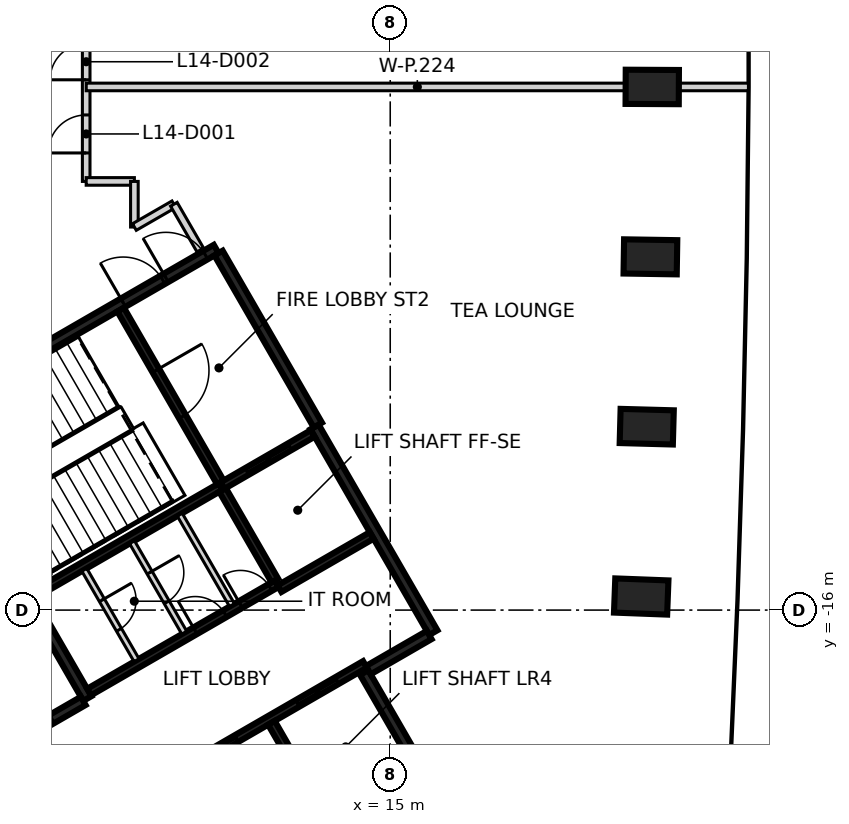
"""IFC4 building model, lengths in metres.
Left out: names, types, materials, properties, quantities, classifications, styles, units other than length and angle.
Written with IfcOpenShell. Run it as: python <this file> out.ifc"""

import sys

from ifc_helpers import new_model, si_unit, direction, frame, frame_2d, origin, origin_2d, place, context, subcontext, project, spatial, rectangle, extrude, element, fill, save


model = new_model("IFC4")
c1 = context("Model", 3, precision=1e-05, world=origin(), true_north=direction((0.0, 1.0)))
c2 = subcontext(c1, "Body", "Model", "MODEL_VIEW")
j1 = project(units=[si_unit("LENGTHUNIT", "METRE"), si_unit("PLANEANGLEUNIT", "RADIAN")], contexts=[c1])
p1 = place(None, origin())
s1 = spatial("IfcSite", under=j1, at=p1, CompositionType="ELEMENT")
p2 = place(p1, origin())
s2 = spatial("IfcBuilding", under=s1, at=p2, CompositionType="ELEMENT")
p3 = place(p2, frame((0.0, 0.0, 63.8)))
s3 = spatial("IfcBuildingStorey", under=s2, at=p3, CompositionType="ELEMENT", Elevation=63.8)
for number, where, z_axis, x_axis in (
    (1, (21.604, -15.643, -0.475), (0.0, 0.0, 1.0), (-0.999, 0.038, 0.0)),
    (2, (21.749, -11.174, -0.475), (0.0, 0.0, 1.0), (-1.0, 0.027, 0.0)),
    (3, (21.846, -6.706, -0.475), (0.0, 0.0, 1.0), (-1.0, 0.016, 0.0)),
    (4, (21.894, -2.235, -0.475), (0.0, 0.0, 1.0), (-1.0, 0.005, 0.0)),
):
    element("IfcColumn", number, at=place(p3, frame(where, z_axis=z_axis, x_axis=x_axis)), inside=s3, PredefinedType="COLUMN", context=c2, shape_type="SweptSolid", body=[
        extrude(rectangle(XDim=1.4, YDim=0.9, at=origin_2d()), origin(), (0.0, 0.0, 1.0), 3.6),
    ])
p4 = place(p3, frame((0.417, -12.273, 0.0), z_axis=(0.0, 0.0, 1.0), x_axis=(0.866021906294, 0.500006057782, 0.0)))
e5 = element("IfcWall", 5, at=p4, inside=s3, PredefinedType="SHEAR", context=c2, shape_type="SweptSolid", body=[
    extrude(rectangle(XDim=11.55, YDim=0.25, at=frame_2d((5.775, 0.0))), origin(), (0.0, 0.0, 1.0), 3.125),
])
p5 = place(p4, frame((10.025, 0.0, 0.0)))
e6 = element("IfcOpeningElement", 6, at=p5, cuts=e5, PredefinedType="OPENING", context=c2, shape_type="SweptSolid", body=[
    extrude(rectangle(XDim=1.2, YDim=2.1, at=frame_2d((0.6, 1.05))), frame((0.0, 0.135, 0.0), z_axis=(0.0, -1.0, 0.0), x_axis=(1.0, 0.0, 0.0)), (0.0, 0.0, 1.0), 0.27),
])
p6 = place(p4, frame((8.725, 0.0, 0.0)))
e7 = element("IfcOpeningElement", 7, at=p6, cuts=e5, PredefinedType="OPENING", context=c2, shape_type="SweptSolid", body=[
    extrude(rectangle(XDim=1.2, YDim=2.1, at=frame_2d((0.6, 1.05))), frame((0.0, 0.135, 0.0), z_axis=(0.0, -1.0, 0.0), x_axis=(1.0, 0.0, 0.0)), (0.0, 0.0, 1.0), 0.27),
])
p7 = place(p3, frame((13.008, -11.181, 0.0), z_axis=(0.0, 0.0, 1.0), x_axis=(0.500004234368, -0.866022959057, 0.0)))
e8 = element("IfcWall", 8, at=p7, inside=s3, PredefinedType="SHEAR", context=c2, shape_type="SweptSolid", body=[
    extrude(rectangle(XDim=6.25, YDim=0.25, at=frame_2d((3.125, 0.0))), origin(), (0.0, 0.0, 1.0), 3.125),
])
p8 = place(p3, frame((10.483, -6.606, 0.0), z_axis=(0.0, 0.0, 1.0), x_axis=(0.49999885962, -0.866026062182, 0.0)))
e9 = element("IfcWall", 9, at=p8, inside=s3, PredefinedType="SHEAR", context=c2, shape_type="SweptSolid", body=[
    extrude(rectangle(XDim=5.225, YDim=0.25, at=frame_2d((2.612, 0.0))), origin(), (0.0, 0.0, 1.0), 3.125),
])
p9 = place(p3, frame((7.031, -18.327, 0.0), z_axis=(0.0, 0.0, 1.0), x_axis=(-0.499971222258, 0.866042017984, 0.0)))
e10 = element("IfcWall", 10, at=p9, inside=s3, PredefinedType="SHEAR", context=c2, shape_type="SweptSolid", body=[
    extrude(rectangle(XDim=3.2, YDim=0.25, at=frame_2d((1.6, 0.0))), origin(), (0.0, 0.0, 1.0), 3.125),
])
p10 = place(p3, frame((14.315, -17.644, 0.0), z_axis=(0.0, 0.0, 1.0), x_axis=(0.500023226632, -0.866011993467, 0.0)))
e11 = element("IfcWall", 11, at=p10, inside=s3, PredefinedType="SHEAR", context=c2, shape_type="SweptSolid", body=[
    extrude(rectangle(XDim=2.974, YDim=0.25, at=frame_2d((1.487, 0.0))), origin(), (0.0, 0.0, 1.0), 3.125),
])
p11 = place(p3, frame((16.025, -16.656, 0.0), z_axis=(0.0, 0.0, 1.0), x_axis=(-0.866016279763, -0.500015802937, 0.0)))
e12 = element("IfcWall", 12, at=p11, inside=s3, PredefinedType="SHEAR", context=c2, shape_type="SweptSolid", body=[
    extrude(rectangle(XDim=1.849, YDim=0.25, at=frame_2d((0.925, 0.0))), origin(), (0.0, 0.0, 1.0), 3.125),
])
p12 = place(p3, frame((6.065, -18.885, 0.0), z_axis=(0.0, 0.0, 1.0), x_axis=(0.866017078145, 0.500014420154, 0.0)))
e13 = element("IfcWall", 13, at=p12, inside=s3, PredefinedType="SHEAR", context=c2, shape_type="SweptSolid", body=[
    extrude(rectangle(XDim=0.989, YDim=0.25, at=frame_2d((0.495, 0.0))), origin(), (0.0, 0.0, 1.0), 3.125),
])
p13 = place(p3, frame((6.08, -20.1, 0.0), z_axis=(0.0, 0.0, 1.0), x_axis=(-0.500051773299, 0.865995510393, 0.0)))
e14 = element("IfcWall", 14, at=p13, inside=s3, PredefinedType="SHEAR", context=c2, shape_type="SweptSolid", body=[
    extrude(rectangle(XDim=0.685, YDim=0.25, at=frame_2d((0.342, 0.0))), origin(), (0.0, 0.0, 1.0), 3.125),
])
p14 = place(p3, frame((9.052, -20.48, 0.0), z_axis=(0.0, 0.0, 1.0), x_axis=(0.866030299012, 0.499991521122, 0.0)))
e15 = element("IfcWall", 15, at=p14, inside=s3, PredefinedType="SHEAR", context=c2, shape_type="SweptSolid", body=[
    extrude(rectangle(XDim=6.1, YDim=0.2, at=frame_2d((3.05, 0.0))), origin(), (0.0, 0.0, 1.0), 3.125),
])
p15 = place(p14, frame((1.0, 0.0, 0.0)))
e16 = element("IfcOpeningElement", 16, at=p15, cuts=e15, PredefinedType="OPENING", context=c2, shape_type="SweptSolid", body=[
    extrude(rectangle(XDim=1.2, YDim=2.1, at=frame_2d((0.6, 1.05))), frame((0.0, 0.11, 0.0), z_axis=(0.0, -1.0, 0.0), x_axis=(1.0, 0.0, 0.0)), (0.0, 0.0, 1.0), 0.22),
])
p16 = place(p14, frame((4.05, 0.0, 0.0)))
e17 = element("IfcOpeningElement", 17, at=p16, cuts=e15, PredefinedType="OPENING", context=c2, shape_type="SweptSolid", body=[
    extrude(rectangle(XDim=1.2, YDim=2.1, at=frame_2d((0.6, 1.05))), frame((0.0, 0.11, 0.0), z_axis=(0.0, -1.0, 0.0), x_axis=(1.0, 0.0, 0.0)), (0.0, 0.0, 1.0), 0.22),
])
p17 = place(p3, frame((10.538, -12.752, 0.0), z_axis=(0.0, 0.0, 1.0), x_axis=(-0.866038630372, -0.499977090179, 0.0)))
e18 = element("IfcWall", 18, at=p17, inside=s3, PredefinedType="SHEAR", context=c2, shape_type="SweptSolid", body=[
    extrude(rectangle(XDim=5.699, YDim=0.2, at=frame_2d((2.85, 0.0))), origin(), (0.0, 0.0, 1.0), 3.125),
])
p18 = place(p3, frame((7.077, -18.156, 0.0), z_axis=(0.0, 0.0, 1.0), x_axis=(0.866038630372, 0.499977090179, 0.0)))
e19 = element("IfcWall", 19, at=p18, inside=s3, PredefinedType="SHEAR", context=c2, shape_type="SweptSolid", body=[
    extrude(rectangle(XDim=5.699, YDim=0.2, at=frame_2d((2.85, 0.0))), origin(), (0.0, 0.0, 1.0), 3.125),
])
p19 = place(p18, frame((3.224, 0.0, 0.0)))
e20 = element("IfcOpeningElement", 20, at=p19, cuts=e19, PredefinedType="OPENING", context=c2, shape_type="SweptSolid", body=[
    extrude(rectangle(XDim=0.9, YDim=2.1, at=frame_2d((0.45, 1.05))), frame((0.0, 0.11, 0.0), z_axis=(0.0, -1.0, 0.0), x_axis=(1.0, 0.0, 0.0)), (0.0, 0.0, 1.0), 0.22),
])
p20 = place(p18, frame((4.599, 0.0, 0.0)))
e21 = element("IfcOpeningElement", 21, at=p20, cuts=e19, PredefinedType="OPENING", context=c2, shape_type="SweptSolid", body=[
    extrude(rectangle(XDim=0.9, YDim=2.1, at=frame_2d((0.45, 1.05))), frame((0.0, 0.11, 0.0), z_axis=(0.0, -1.0, 0.0), x_axis=(1.0, 0.0, 0.0)), (0.0, 0.0, 1.0), 0.22),
])
p21 = place(p3, frame((7.906, -8.094, 0.0), z_axis=(0.0, 0.0, 1.0), x_axis=(0.500024287448, -0.866011380966, 0.0)))
e22 = element("IfcWall", 22, at=p21, inside=s3, PredefinedType="SHEAR", context=c2, shape_type="SweptSolid", body=[
    extrude(rectangle(XDim=5.251, YDim=0.2, at=frame_2d((2.625, 0.0))), origin(), (0.0, 0.0, 1.0), 3.125),
])
p22 = place(p21, frame((1.849, 0.0, 0.0)))
e23 = element("IfcOpeningElement", 23, at=p22, cuts=e22, PredefinedType="OPENING", context=c2, shape_type="SweptSolid", body=[
    extrude(rectangle(XDim=1.4, YDim=2.1, at=frame_2d((0.7, 1.05))), frame((0.0, 0.11, 0.0), z_axis=(0.0, -1.0, 0.0), x_axis=(1.0, 0.0, 0.0)), (0.0, 0.0, 1.0), 0.22),
])
p23 = place(p3, frame((11.875, -18.967, 0.0), z_axis=(0.0, 0.0, 1.0), x_axis=(0.49998131003, -0.866036194175, 0.0)))
e24 = element("IfcWall", 24, at=p23, inside=s3, PredefinedType="SHEAR", context=c2, shape_type="SweptSolid", body=[
    extrude(rectangle(XDim=3.048, YDim=0.2, at=frame_2d((1.524, 0.0))), origin(), (0.0, 0.0, 1.0), 3.125),
])
p24 = place(p3, frame((11.963, -15.22, 0.0), z_axis=(0.0, 0.0, 1.0), x_axis=(-0.500034990121, 0.866005201286, 0.0)))
e25 = element("IfcWall", 25, at=p24, inside=s3, PredefinedType="SHEAR", context=c2, shape_type="SweptSolid", body=[
    extrude(rectangle(XDim=2.75, YDim=0.2, at=frame_2d((1.375, 0.0))), origin(), (0.0, 0.0, 1.0), 3.125),
])
p25 = place(p3, frame((10.587, -12.723, 0.0), z_axis=(0.0, 0.0, 1.0), x_axis=(0.866037306777, 0.499979382845, 0.0)))
e26 = element("IfcWall", 26, at=p25, inside=s3, PredefinedType="SHEAR", context=c2, shape_type="SweptSolid", body=[
    extrude(rectangle(XDim=2.742, YDim=0.2, at=frame_2d((1.371, 0.0))), origin(), (0.0, 0.0, 1.0), 3.125),
])
p26 = place(p25, frame((0.743, 0.0, 0.0)))
e27 = element("IfcOpeningElement", 27, at=p26, cuts=e26, PredefinedType="OPENING", context=c2, shape_type="SweptSolid", body=[
    extrude(rectangle(XDim=1.3, YDim=2.1, at=frame_2d((0.65, 1.05))), frame((0.0, 0.11, 0.0), z_axis=(0.0, -1.0, 0.0), x_axis=(1.0, 0.0, 0.0)), (0.0, 0.0, 1.0), 0.22),
])
p27 = place(p3, frame((14.512, -14.037, 0.0), z_axis=(0.0, 0.0, 1.0), x_axis=(-0.866044696403, -0.499966582715, 0.0)))
e28 = element("IfcWall", 28, at=p27, inside=s3, PredefinedType="SHEAR", context=c2, shape_type="SweptSolid", body=[
    extrude(rectangle(XDim=2.799, YDim=0.2, at=frame_2d((1.399, 0.0))), origin(), (0.0, 0.0, 1.0), 3.125),
])
p28 = place(p3, frame((8.207, -14.214, 0.0), z_axis=(0.0, 0.0, 1.0), x_axis=(0.50002746344, -0.86600954718, 0.0)))
e29 = element("IfcWall", 29, at=p28, inside=s3, PredefinedType="PARTITIONING", context=c2, shape_type="SweptSolid", body=[
    extrude(rectangle(XDim=2.748, YDim=0.15, at=frame_2d((1.374, 0.0))), origin(), (0.0, 0.0, 1.0), 3.125),
])
p29 = place(p28, frame((0.924, 0.0, 0.0)))
e30 = element("IfcOpeningElement", 30, at=p29, cuts=e29, PredefinedType="OPENING", context=c2, shape_type="SweptSolid", body=[
    extrude(rectangle(XDim=0.9, YDim=2.1, at=frame_2d((0.45, 1.05))), frame((0.0, 0.085, 0.0), z_axis=(0.0, -1.0, 0.0), x_axis=(1.0, 0.0, 0.0)), (0.0, 0.0, 1.0), 0.17),
])
p30 = place(p3, frame((9.462, -13.489, 0.0), z_axis=(0.0, 0.0, 1.0), x_axis=(0.499988999718, -0.866031754707, 0.0)))
e31 = element("IfcWall", 31, at=p30, inside=s3, PredefinedType="PARTITIONING", context=c2, shape_type="SweptSolid", body=[
    extrude(rectangle(XDim=2.749, YDim=0.15, at=frame_2d((1.374, 0.0))), origin(), (0.0, 0.0, 1.0), 3.125),
])
p31 = place(p3, frame((6.951, -14.939, 0.0), z_axis=(0.0, 0.0, 1.0), x_axis=(0.499988999718, -0.866031754707, 0.0)))
e32 = element("IfcWall", 32, at=p31, inside=s3, PredefinedType="PARTITIONING", context=c2, shape_type="SweptSolid", body=[
    extrude(rectangle(XDim=2.749, YDim=0.15, at=frame_2d((1.374, 0.0))), origin(), (0.0, 0.0, 1.0), 3.125),
])
p32 = place(p31, frame((0.924, 0.0, 0.0)))
e33 = element("IfcOpeningElement", 33, at=p32, cuts=e32, PredefinedType="OPENING", context=c2, shape_type="SweptSolid", body=[
    extrude(rectangle(XDim=0.9, YDim=2.1, at=frame_2d((0.45, 1.05))), frame((0.0, 0.085, 0.0), z_axis=(0.0, -1.0, 0.0), x_axis=(1.0, 0.0, 0.0)), (0.0, 0.0, 1.0), 0.17),
])
p33 = place(p3, frame((7.0, -4.721, 0.0), z_axis=(0.0, 0.0, 1.0), x_axis=(0.0, 1.0, 0.0)))
e34 = element("IfcWall", 34, at=p33, inside=s3, PredefinedType="PARTITIONING", context=c2, shape_type="SweptSolid", body=[
    extrude(rectangle(XDim=8.799, YDim=0.2, at=frame_2d((4.399, 0.0))), origin(), (0.0, 0.0, 1.0), 3.125),
])
p34 = place(p33, frame((0.749, 0.0, 0.0)))
e35 = element("IfcOpeningElement", 35, at=p34, cuts=e34, PredefinedType="OPENING", context=c2, shape_type="SweptSolid", body=[
    extrude(rectangle(XDim=1.0, YDim=2.1, at=frame_2d((0.5, 1.05))), frame((0.0, 0.11, 0.0), z_axis=(0.0, -1.0, 0.0), x_axis=(1.0, 0.0, 0.0)), (0.0, 0.0, 1.0), 0.22),
])
p35 = place(p33, frame((2.674, 0.0, 0.0)))
e36 = element("IfcOpeningElement", 36, at=p35, cuts=e34, PredefinedType="OPENING", context=c2, shape_type="SweptSolid", body=[
    extrude(rectangle(XDim=0.95, YDim=2.1, at=frame_2d((0.475, 1.05))), frame((0.0, 0.11, 0.0), z_axis=(0.0, -1.0, 0.0), x_axis=(1.0, 0.0, 0.0)), (0.0, 0.0, 1.0), 0.22),
])
p36 = place(p3, frame((7.0, -4.721, 0.0), z_axis=(0.0, 0.0, 1.0), x_axis=(1.0, 0.0, 0.0)))
e37 = element("IfcWall", 37, at=p36, inside=s3, PredefinedType="PARTITIONING", context=c2, shape_type="SweptSolid", body=[
    extrude(rectangle(XDim=1.268, YDim=0.2, at=frame_2d((0.634, 0.0))), origin(), (0.0, 0.0, 1.0), 3.125),
])
p37 = place(p3, frame((8.268, -5.921, 0.0), z_axis=(0.0, 0.0, 1.0), x_axis=(0.0, 1.0, 0.0)))
e38 = element("IfcWall", 38, at=p37, inside=s3, PredefinedType="PARTITIONING", context=c2, shape_type="SweptSolid", body=[
    extrude(rectangle(XDim=1.2, YDim=0.2, at=frame_2d((0.6, 0.0))), origin(), (0.0, 0.0, 1.0), 3.125),
])
p38 = place(p3, frame((8.268, -5.921, 0.0), z_axis=(0.0, 0.0, 1.0), x_axis=(0.866344856625, 0.499446282797, 0.0)))
e39 = element("IfcWall", 39, at=p38, inside=s3, PredefinedType="PARTITIONING", context=c2, shape_type="SweptSolid", body=[
    extrude(rectangle(XDim=1.199, YDim=0.2, at=frame_2d((0.6, 0.0))), origin(), (0.0, 0.0, 1.0), 3.125),
])
p39 = place(p3, frame((9.307, -5.322, 0.0), z_axis=(0.0, 0.0, 1.0), x_axis=(0.500295157811, -0.865854927266, 0.0)))
e40 = element("IfcWall", 40, at=p39, inside=s3, PredefinedType="PARTITIONING", context=c2, shape_type="SweptSolid", body=[
    extrude(rectangle(XDim=1.39, YDim=0.2, at=frame_2d((0.695, 0.0))), origin(), (0.0, 0.0, 1.0), 3.125),
])
p40 = place(p3, frame((7.001, -2.235, 0.0), z_axis=(0.0, 0.0, 1.0), x_axis=(1.0, 0.0, 0.0)))
e41 = element("IfcWall", 41, at=p40, inside=s3, PredefinedType="PARTITIONING", context=c2, shape_type="SweptSolid", body=[
    extrude(rectangle(XDim=17.424, YDim=0.2, at=frame_2d((8.712, 0.0))), origin(), (0.0, 0.0, 1.0), 3.125),
])
p41 = place(p26, origin())
e42 = element("IfcDoor", 42, at=p41, inside=s3, OperationType="SLIDING_TO_LEFT", PredefinedType="DOOR", context=c2, shape_type="SweptSolid", body=[
    extrude(rectangle(XDim=1.3, YDim=2.1, at=frame_2d((0.65, 1.05))), frame((0.0, 0.025, 0.0), z_axis=(0.0, -1.0, 0.0), x_axis=(1.0, 0.0, 0.0)), (0.0, 0.0, 1.0), 0.05),
])
fill(e27, e42)
p42 = place(p15, origin())
e43 = element("IfcDoor", 43, at=p42, inside=s3, OperationType="DOUBLE_DOOR_SLIDING", PredefinedType="DOOR", context=c2, shape_type="SweptSolid", body=[
    extrude(rectangle(XDim=1.2, YDim=2.1, at=frame_2d((0.6, 1.05))), frame((0.0, 0.025, 0.0), z_axis=(0.0, -1.0, 0.0), x_axis=(1.0, 0.0, 0.0)), (0.0, 0.0, 1.0), 0.05),
])
fill(e16, e43)
p43 = place(p16, origin())
e44 = element("IfcDoor", 44, at=p43, inside=s3, OperationType="DOUBLE_DOOR_SLIDING", PredefinedType="DOOR", context=c2, shape_type="SweptSolid", body=[
    extrude(rectangle(XDim=1.2, YDim=2.1, at=frame_2d((0.6, 1.05))), frame((0.0, 0.025, 0.0), z_axis=(0.0, -1.0, 0.0), x_axis=(1.0, 0.0, 0.0)), (0.0, 0.0, 1.0), 0.05),
])
fill(e17, e44)
p44 = place(p5, origin())
e45 = element("IfcDoor", 45, at=p44, inside=s3, OperationType="SINGLE_SWING_LEFT", PredefinedType="DOOR", context=c2, shape_type="SweptSolid", body=[
    extrude(rectangle(XDim=1.2, YDim=2.1, at=frame_2d((0.6, 1.05))), frame((0.0, 0.025, 0.0), z_axis=(0.0, -1.0, 0.0), x_axis=(1.0, 0.0, 0.0)), (0.0, 0.0, 1.0), 0.05),
])
fill(e6, e45)
p45 = place(p6, origin())
e46 = element("IfcDoor", 46, at=p45, inside=s3, OperationType="SINGLE_SWING_RIGHT", PredefinedType="DOOR", context=c2, shape_type="SweptSolid", body=[
    extrude(rectangle(XDim=1.2, YDim=2.1, at=frame_2d((0.6, 1.05))), frame((0.0, 0.025, 0.0), z_axis=(0.0, -1.0, 0.0), x_axis=(1.0, 0.0, 0.0)), (0.0, 0.0, 1.0), 0.05),
])
fill(e7, e46)
p46 = place(p22, origin())
e47 = element("IfcDoor", 47, at=p46, inside=s3, OperationType="SINGLE_SWING_LEFT", PredefinedType="DOOR", context=c2, shape_type="SweptSolid", body=[
    extrude(rectangle(XDim=1.4, YDim=2.1, at=frame_2d((0.7, 1.05))), frame((0.0, 0.025, 0.0), z_axis=(0.0, -1.0, 0.0), x_axis=(1.0, 0.0, 0.0)), (0.0, 0.0, 1.0), 0.05),
])
fill(e23, e47)
p47 = place(p19, origin())
e48 = element("IfcDoor", 48, at=p47, inside=s3, OperationType="SINGLE_SWING_RIGHT", PredefinedType="DOOR", context=c2, shape_type="SweptSolid", body=[
    extrude(rectangle(XDim=0.9, YDim=2.1, at=frame_2d((0.45, 1.05))), frame((0.0, 0.025, 0.0), z_axis=(0.0, -1.0, 0.0), x_axis=(1.0, 0.0, 0.0)), (0.0, 0.0, 1.0), 0.05),
])
fill(e20, e48)
p48 = place(p20, origin())
e49 = element("IfcDoor", 49, at=p48, inside=s3, OperationType="SINGLE_SWING_LEFT", PredefinedType="DOOR", context=c2, shape_type="SweptSolid", body=[
    extrude(rectangle(XDim=0.9, YDim=2.1, at=frame_2d((0.45, 1.05))), frame((0.0, 0.025, 0.0), z_axis=(0.0, -1.0, 0.0), x_axis=(1.0, 0.0, 0.0)), (0.0, 0.0, 1.0), 0.05),
])
fill(e21, e49)
p49 = place(p29, origin())
e50 = element("IfcDoor", 50, at=p49, inside=s3, OperationType="SINGLE_SWING_LEFT", PredefinedType="DOOR", context=c2, shape_type="SweptSolid", body=[
    extrude(rectangle(XDim=0.9, YDim=2.1, at=frame_2d((0.45, 1.05))), frame((0.0, 0.025, 0.0), z_axis=(0.0, -1.0, 0.0), x_axis=(1.0, 0.0, 0.0)), (0.0, 0.0, 1.0), 0.05),
])
fill(e30, e50)
p50 = place(p32, origin())
e51 = element("IfcDoor", 51, at=p50, inside=s3, OperationType="SINGLE_SWING_RIGHT", PredefinedType="DOOR", context=c2, shape_type="SweptSolid", body=[
    extrude(rectangle(XDim=0.9, YDim=2.1, at=frame_2d((0.45, 1.05))), frame((0.0, 0.025, 0.0), z_axis=(0.0, -1.0, 0.0), x_axis=(1.0, 0.0, 0.0)), (0.0, 0.0, 1.0), 0.05),
])
fill(e33, e51)
p51 = place(p34, frame((1.0, 0.0, 0.0), z_axis=(0.0, 0.0, 1.0), x_axis=(-1.0, 0.0, 0.0)))
e52 = element("IfcDoor", 52, at=p51, inside=s3, OperationType="SINGLE_SWING_LEFT", PredefinedType="DOOR", context=c2, shape_type="SweptSolid", body=[
    extrude(rectangle(XDim=1.0, YDim=2.1, at=frame_2d((0.5, 1.05))), frame((0.0, 0.025, 0.0), z_axis=(0.0, -1.0, 0.0), x_axis=(1.0, 0.0, 0.0)), (0.0, 0.0, 1.0), 0.05),
])
fill(e35, e52)
p52 = place(p35, frame((0.95, 0.0, 0.0), z_axis=(0.0, 0.0, 1.0), x_axis=(-1.0, 0.0, 0.0)))
e53 = element("IfcDoor", 53, at=p52, inside=s3, OperationType="SINGLE_SWING_LEFT", PredefinedType="DOOR", context=c2, shape_type="SweptSolid", body=[
    extrude(rectangle(XDim=0.95, YDim=2.1, at=frame_2d((0.475, 1.05))), frame((0.0, 0.025, 0.0), z_axis=(0.0, -1.0, 0.0), x_axis=(1.0, 0.0, 0.0)), (0.0, 0.0, 1.0), 0.05),
])
fill(e36, e53)
save(model, sys.argv[1])
